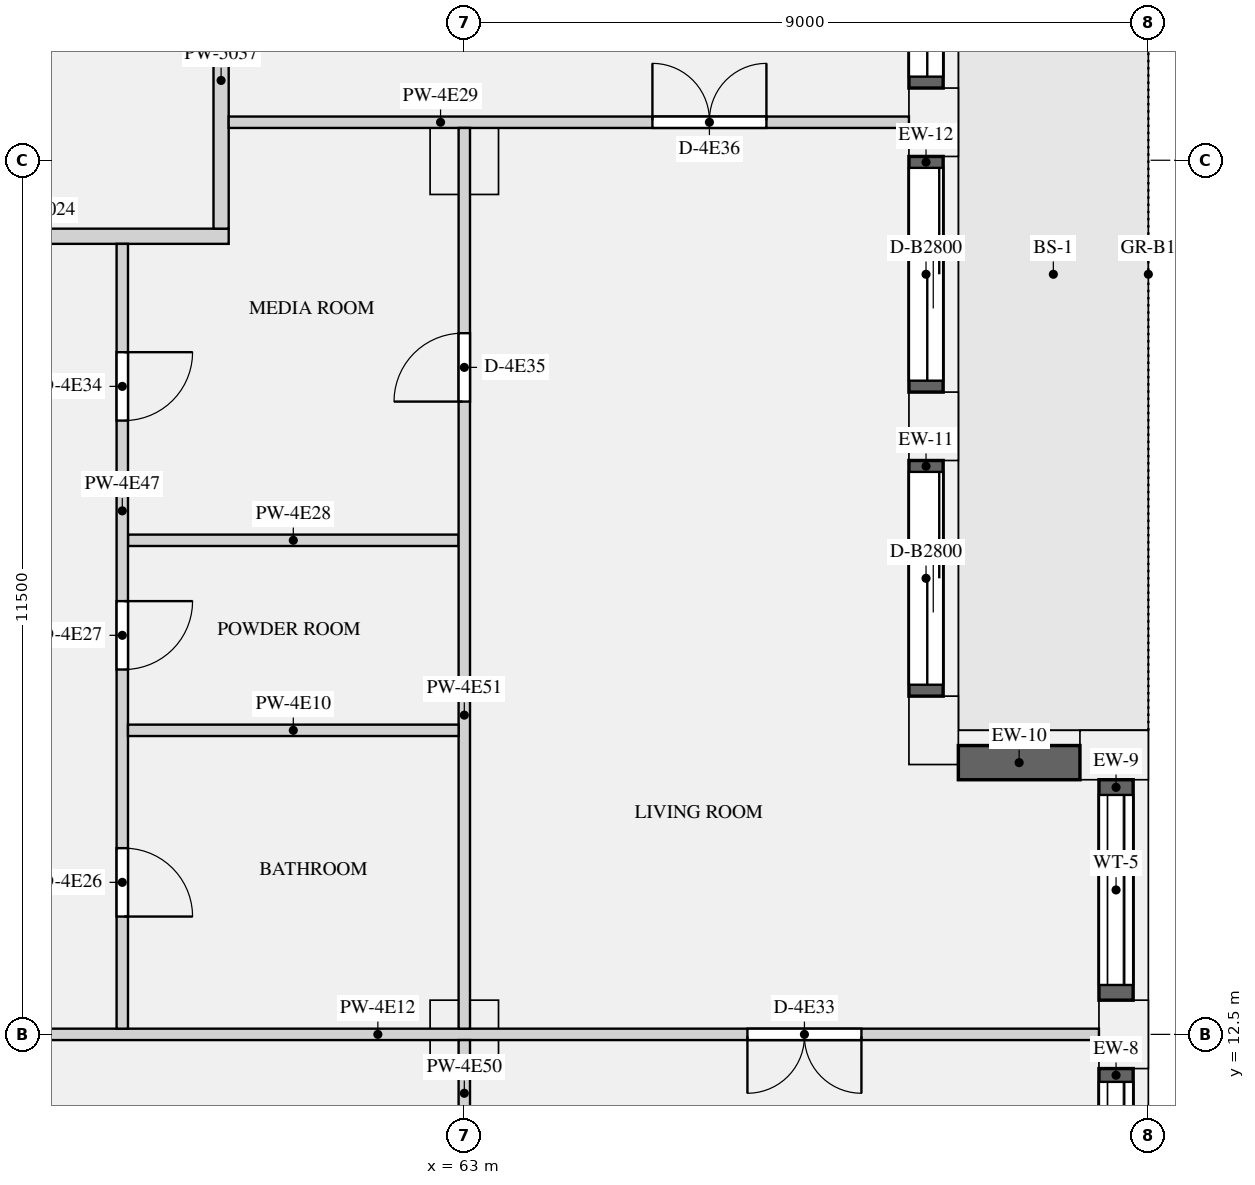
"""IFC4 building model, lengths in metres.
Left out: names, types, materials, properties, quantities, classifications, styles, units other than length and angle.
Written with IfcOpenShell. Run it as: python <this file> out.ifc"""

import sys

from ifc_helpers import new_model, si_unit, direction, frame, frame_2d, origin, origin_2d, place, context, subcontext, project, spatial, rectangle, extrude, element, fill, save


model = new_model("IFC4")
c1 = context("Model", 3, precision=1e-05, world=origin(), true_north=direction((0.0, 1.0)))
c2 = subcontext(c1, "Body", "Model", "MODEL_VIEW")
j1 = project(units=[si_unit("LENGTHUNIT", "METRE"), si_unit("PLANEANGLEUNIT", "RADIAN")], contexts=[c1])
p1 = place(None, origin())
s1 = spatial("IfcSite", under=j1, at=p1, CompositionType="ELEMENT")
p2 = place(p1, origin())
s2 = spatial("IfcBuilding", under=s1, at=p2, CompositionType="ELEMENT")
p3 = place(p2, frame((0.0, 0.0, 232.65)))
s3 = spatial("IfcBuildingStorey", under=s2, at=p3, CompositionType="ELEMENT", Elevation=232.65)
for number, where, z_axis, x_axis in (
    (1, (71.675, 12.5, 0.0), (0.0, 0.0, 1.0), (0.0, 1.0, 0.0)),
    (2, (71.55, 16.175, 0.0), (0.0, 0.0, 1.0), (-1.0, 0.0, 0.0)),
    (3, (69.175, 16.5, 0.0), (0.0, 0.0, 1.0), (0.0, 1.0, 0.0)),
    (4, (69.175, 20.5, 0.0), (0.0, 0.0, 1.0), (0.0, 1.0, 0.0)),
    (5, (69.175, 24.5, 0.0), (0.0, 0.0, 1.0), (0.0, 1.0, 0.0)),
):
    element("IfcColumn", number, at=place(p3, frame(where, z_axis=z_axis, x_axis=x_axis)), inside=s3, PredefinedType="USERDEFINED", context=c2, shape_type="SweptSolid", body=[
        extrude(rectangle(XDim=0.9, YDim=0.65, at=origin_2d()), origin(), (0.0, 0.0, 1.0), 3.15),
    ])
for number, where, z_axis, x_axis in (
    (6, (63.0, 24.0, 0.0), (0.0, 0.0, 1.0), (1.0, 0.0, 0.0)),
    (7, (63.0, 12.5, 0.0), (0.0, 0.0, 1.0), (1.0, 0.0, 0.0)),
):
    element("IfcColumn", number, at=place(p3, frame(where, z_axis=z_axis, x_axis=x_axis)), inside=s3, PredefinedType="COLUMN", context=c2, shape_type="SweptSolid", body=[
        extrude(rectangle(XDim=0.9, YDim=0.9, at=origin_2d()), origin(), (0.0, 0.0, 1.0), 3.15),
    ])
p4 = place(p3, frame((71.575, 8.95, 0.9), z_axis=(0.0, 0.0, 1.0), x_axis=(0.0, 1.0, 0.0)))
e8 = element("IfcWall", 8, at=p4, inside=s3, PredefinedType="SOLIDWALL", context=c2, shape_type="SweptSolid", body=[
    extrude(rectangle(XDim=3.1, YDim=0.45, at=frame_2d((1.55, 0.0))), origin(), (0.0, 0.0, 1.0), 1.9),
])
p5 = place(p4, frame((0.175, 0.0, 0.15)))
e9 = element("IfcOpeningElement", 9, at=p5, cuts=e8, PredefinedType="OPENING", context=c2, shape_type="SweptSolid", body=[
    extrude(rectangle(XDim=2.75, YDim=1.5, at=frame_2d((1.375, 0.75))), frame((0.0, 0.235, 0.0), z_axis=(0.0, -1.0, 0.0), x_axis=(1.0, 0.0, 0.0)), (0.0, 0.0, 1.0), 0.47),
])
p6 = place(p3, frame((71.575, 12.95, 0.9), z_axis=(0.0, 0.0, 1.0), x_axis=(0.0, 1.0, 0.0)))
e10 = element("IfcWall", 10, at=p6, inside=s3, PredefinedType="SOLIDWALL", context=c2, shape_type="SweptSolid", body=[
    extrude(rectangle(XDim=2.9, YDim=0.45, at=frame_2d((1.45, 0.0))), origin(), (0.0, 0.0, 1.0), 1.9),
])
p7 = place(p6, frame((0.2, 0.0, 0.15)))
e11 = element("IfcOpeningElement", 11, at=p7, cuts=e10, PredefinedType="OPENING", context=c2, shape_type="SweptSolid", body=[
    extrude(rectangle(XDim=2.5, YDim=1.5, at=frame_2d((1.25, 0.75))), frame((0.0, 0.235, 0.0), z_axis=(0.0, -1.0, 0.0), x_axis=(1.0, 0.0, 0.0)), (0.0, 0.0, 1.0), 0.47),
])
p8 = place(p3, frame((71.1, 16.075, 0.9), z_axis=(0.0, 0.0, 1.0), x_axis=(-1.0, 0.0, 0.0)))
e12 = element("IfcWall", 12, at=p8, inside=s3, PredefinedType="SOLIDWALL", context=c2, shape_type="SweptSolid", body=[
    extrude(rectangle(XDim=1.6, YDim=0.45, at=frame_2d((0.8, 0.0))), origin(), (0.0, 0.0, 1.0), 1.9),
])
p9 = place(p3, frame((69.075, 16.95, 0.0), z_axis=(0.0, 0.0, 1.0), x_axis=(0.0, 1.0, 0.0)))
e13 = element("IfcWall", 13, at=p9, inside=s3, PredefinedType="SOLIDWALL", context=c2, shape_type="SweptSolid", body=[
    extrude(rectangle(XDim=3.1, YDim=0.45, at=frame_2d((1.55, 0.0))), origin(), (0.0, 0.0, 1.0), 2.8),
])
p10 = place(p9, frame((0.15, 0.0, 0.0)))
e14 = element("IfcOpeningElement", 14, at=p10, cuts=e13, PredefinedType="OPENING", context=c2, shape_type="SweptSolid", body=[
    extrude(rectangle(XDim=2.8, YDim=2.3, at=frame_2d((1.4, 1.15))), frame((0.0, 0.235, 0.0), z_axis=(0.0, -1.0, 0.0), x_axis=(1.0, 0.0, 0.0)), (0.0, 0.0, 1.0), 0.47),
])
p11 = place(p3, frame((69.075, 20.95, 0.0), z_axis=(0.0, 0.0, 1.0), x_axis=(0.0, 1.0, 0.0)))
e15 = element("IfcWall", 15, at=p11, inside=s3, PredefinedType="SOLIDWALL", context=c2, shape_type="SweptSolid", body=[
    extrude(rectangle(XDim=3.1, YDim=0.45, at=frame_2d((1.55, 0.0))), origin(), (0.0, 0.0, 1.0), 2.8),
])
p12 = place(p11, frame((0.15, 0.0, 0.0)))
e16 = element("IfcOpeningElement", 16, at=p12, cuts=e15, PredefinedType="OPENING", context=c2, shape_type="SweptSolid", body=[
    extrude(rectangle(XDim=2.8, YDim=2.3, at=frame_2d((1.4, 1.15))), frame((0.0, 0.235, 0.0), z_axis=(0.0, -1.0, 0.0), x_axis=(1.0, 0.0, 0.0)), (0.0, 0.0, 1.0), 0.47),
])
p13 = place(p3, frame((69.075, 24.95, 0.0), z_axis=(0.0, 0.0, 1.0), x_axis=(0.0, 1.0, 0.0)))
e17 = element("IfcWall", 17, at=p13, inside=s3, PredefinedType="SOLIDWALL", context=c2, shape_type="SweptSolid", body=[
    extrude(rectangle(XDim=3.55, YDim=0.45, at=frame_2d((1.775, 0.0))), origin(), (0.0, 0.0, 1.0), 2.8),
])
p14 = place(p13, frame((0.15, 0.0, 0.0)))
e18 = element("IfcOpeningElement", 18, at=p14, cuts=e17, PredefinedType="OPENING", context=c2, shape_type="SweptSolid", body=[
    extrude(rectangle(XDim=3.25, YDim=2.3, at=frame_2d((1.625, 1.15))), frame((0.0, 0.235, 0.0), z_axis=(0.0, -1.0, 0.0), x_axis=(1.0, 0.0, 0.0)), (0.0, 0.0, 1.0), 0.47),
])
p15 = place(p3, frame((54.9, 23.0, 0.0), z_axis=(0.0, 0.0, 1.0), x_axis=(1.0, 0.0, 0.0)))
e19 = element("IfcWall", 19, at=p15, inside=s3, PredefinedType="PARTITIONING", context=c2, shape_type="SweptSolid", body=[
    extrude(rectangle(XDim=5.0, YDim=0.2, at=frame_2d((2.5, 0.0))), origin(), (0.0, 0.0, 1.0), 2.8),
])
p16 = place(p3, frame((59.8, 23.1, 0.0), z_axis=(0.0, 0.0, 1.0), x_axis=(0.0, 1.0, 0.0)))
e20 = element("IfcWall", 20, at=p16, inside=s3, PredefinedType="PARTITIONING", context=c2, shape_type="SweptSolid", body=[
    extrude(rectangle(XDim=3.9, YDim=0.2, at=frame_2d((1.95, 0.0))), origin(), (0.0, 0.0, 1.0), 2.8),
])
p17 = place(p3, frame((58.575, 16.5, 0.0), z_axis=(0.0, 0.0, 1.0), x_axis=(1.0, 0.0, 0.0)))
e21 = element("IfcWall", 21, at=p17, inside=s3, PredefinedType="PARTITIONING", context=c2, shape_type="SweptSolid", body=[
    extrude(rectangle(XDim=4.35, YDim=0.15, at=frame_2d((2.175, 0.0))), origin(), (0.0, 0.0, 1.0), 2.8),
])
p18 = place(p3, frame((54.0, 12.5, 0.0), z_axis=(0.0, 0.0, 1.0), x_axis=(1.0, 0.0, 0.0)))
e22 = element("IfcWall", 22, at=p18, inside=s3, PredefinedType="PARTITIONING", context=c2, shape_type="SweptSolid", body=[
    extrude(rectangle(XDim=17.35, YDim=0.15, at=frame_2d((8.675, 0.0))), origin(), (0.0, 0.0, 1.0), 2.8),
])
p19 = place(p18, frame((1.5, 0.0, 0.0)))
e23 = element("IfcOpeningElement", 23, at=p19, cuts=e22, PredefinedType="OPENING", context=c2, shape_type="SweptSolid", body=[
    extrude(rectangle(XDim=1.5, YDim=2.1, at=frame_2d((0.75, 1.05))), frame((0.0, 0.085, 0.0), z_axis=(0.0, -1.0, 0.0), x_axis=(1.0, 0.0, 0.0)), (0.0, 0.0, 1.0), 0.17),
])
p20 = place(p18, frame((12.725, 0.0, 0.0)))
e24 = element("IfcOpeningElement", 24, at=p20, cuts=e22, PredefinedType="OPENING", context=c2, shape_type="SweptSolid", body=[
    extrude(rectangle(XDim=1.5, YDim=2.1, at=frame_2d((0.75, 1.05))), frame((0.0, 0.085, 0.0), z_axis=(0.0, -1.0, 0.0), x_axis=(1.0, 0.0, 0.0)), (0.0, 0.0, 1.0), 0.17),
])
p21 = place(p3, frame((58.575, 19.0, 0.0), z_axis=(0.0, 0.0, 1.0), x_axis=(1.0, 0.0, 0.0)))
e25 = element("IfcWall", 25, at=p21, inside=s3, PredefinedType="PARTITIONING", context=c2, shape_type="SweptSolid", body=[
    extrude(rectangle(XDim=4.35, YDim=0.15, at=frame_2d((2.175, 0.0))), origin(), (0.0, 0.0, 1.0), 2.8),
])
p22 = place(p3, frame((59.9, 24.5, 0.0), z_axis=(0.0, 0.0, 1.0), x_axis=(1.0, 0.0, 0.0)))
e26 = element("IfcWall", 26, at=p22, inside=s3, PredefinedType="PARTITIONING", context=c2, shape_type="SweptSolid", body=[
    extrude(rectangle(XDim=8.95, YDim=0.15, at=frame_2d((4.475, 0.0))), origin(), (0.0, 0.0, 1.0), 2.8),
])
p23 = place(p22, frame((5.575, 0.0, 0.0)))
e27 = element("IfcOpeningElement", 27, at=p23, cuts=e26, PredefinedType="OPENING", context=c2, shape_type="SweptSolid", body=[
    extrude(rectangle(XDim=1.5, YDim=2.1, at=frame_2d((0.75, 1.05))), frame((0.0, 0.085, 0.0), z_axis=(0.0, -1.0, 0.0), x_axis=(1.0, 0.0, 0.0)), (0.0, 0.0, 1.0), 0.17),
])
p24 = place(p3, frame((58.5, 12.575, 0.0), z_axis=(0.0, 0.0, 1.0), x_axis=(0.0, 1.0, 0.0)))
e28 = element("IfcWall", 28, at=p24, inside=s3, PredefinedType="PARTITIONING", context=c2, shape_type="SweptSolid", body=[
    extrude(rectangle(XDim=10.325, YDim=0.15, at=frame_2d((5.163, 0.0))), origin(), (0.0, 0.0, 1.0), 2.8),
])
p25 = place(p24, frame((1.475, 0.0, 0.0)))
e29 = element("IfcOpeningElement", 29, at=p25, cuts=e28, PredefinedType="OPENING", context=c2, shape_type="SweptSolid", body=[
    extrude(rectangle(XDim=0.9, YDim=2.1, at=frame_2d((0.45, 1.05))), frame((0.0, 0.085, 0.0), z_axis=(0.0, -1.0, 0.0), x_axis=(1.0, 0.0, 0.0)), (0.0, 0.0, 1.0), 0.17),
])
p26 = place(p24, frame((4.725, 0.0, 0.0)))
e30 = element("IfcOpeningElement", 30, at=p26, cuts=e28, PredefinedType="OPENING", context=c2, shape_type="SweptSolid", body=[
    extrude(rectangle(XDim=0.9, YDim=2.1, at=frame_2d((0.45, 1.05))), frame((0.0, 0.085, 0.0), z_axis=(0.0, -1.0, 0.0), x_axis=(1.0, 0.0, 0.0)), (0.0, 0.0, 1.0), 0.17),
])
p27 = place(p24, frame((8.0, 0.0, 0.0)))
e31 = element("IfcOpeningElement", 31, at=p27, cuts=e28, PredefinedType="OPENING", context=c2, shape_type="SweptSolid", body=[
    extrude(rectangle(XDim=0.9, YDim=2.1, at=frame_2d((0.45, 1.05))), frame((0.0, 0.085, 0.0), z_axis=(0.0, -1.0, 0.0), x_axis=(1.0, 0.0, 0.0)), (0.0, 0.0, 1.0), 0.17),
])
p28 = place(p3, frame((63.0, 8.575, 0.0), z_axis=(0.0, 0.0, 1.0), x_axis=(0.0, 1.0, 0.0)))
e32 = element("IfcWall", 32, at=p28, inside=s3, PredefinedType="PARTITIONING", context=c2, shape_type="SweptSolid", body=[
    extrude(rectangle(XDim=3.85, YDim=0.15, at=frame_2d((1.925, 0.0))), origin(), (0.0, 0.0, 1.0), 2.8),
])
p29 = place(p28, frame((0.95, 0.0, 0.0)))
e33 = element("IfcOpeningElement", 33, at=p29, cuts=e32, PredefinedType="OPENING", context=c2, shape_type="SweptSolid", body=[
    extrude(rectangle(XDim=1.5, YDim=2.1, at=frame_2d((0.75, 1.05))), frame((0.0, 0.085, 0.0), z_axis=(0.0, -1.0, 0.0), x_axis=(1.0, 0.0, 0.0)), (0.0, 0.0, 1.0), 0.17),
])
p30 = place(p3, frame((63.0, 12.575, 0.0), z_axis=(0.0, 0.0, 1.0), x_axis=(0.0, 1.0, 0.0)))
e34 = element("IfcWall", 34, at=p30, inside=s3, PredefinedType="PARTITIONING", context=c2, shape_type="SweptSolid", body=[
    extrude(rectangle(XDim=11.85, YDim=0.15, at=frame_2d((5.925, 0.0))), origin(), (0.0, 0.0, 1.0), 2.8),
])
p31 = place(p30, frame((8.25, 0.0, 0.0)))
e35 = element("IfcOpeningElement", 35, at=p31, cuts=e34, PredefinedType="OPENING", context=c2, shape_type="SweptSolid", body=[
    extrude(rectangle(XDim=0.9, YDim=2.1, at=frame_2d((0.45, 1.05))), frame((0.0, 0.085, 0.0), z_axis=(0.0, -1.0, 0.0), x_axis=(1.0, 0.0, 0.0)), (0.0, 0.0, 1.0), 0.17),
])
p32 = place(p5, origin())
e36 = element("IfcWindow", 36, at=p32, inside=s3, PartitioningType="SINGLE_PANEL", PredefinedType="WINDOW", context=c2, shape_type="SweptSolid", body=[
    extrude(rectangle(XDim=2.75, YDim=1.5, at=frame_2d((1.375, 0.75))), frame((0.0, -0.065, 0.0), z_axis=(0.0, -1.0, 0.0), x_axis=(1.0, 0.0, 0.0)), (0.0, 0.0, 1.0), 0.06),
])
fill(e9, e36)
p33 = place(p7, origin())
e37 = element("IfcWindow", 37, at=p33, inside=s3, PartitioningType="SINGLE_PANEL", PredefinedType="WINDOW", context=c2, shape_type="SweptSolid", body=[
    extrude(rectangle(XDim=2.5, YDim=1.5, at=frame_2d((1.25, 0.75))), frame((0.0, -0.065, 0.0), z_axis=(0.0, -1.0, 0.0), x_axis=(1.0, 0.0, 0.0)), (0.0, 0.0, 1.0), 0.06),
])
fill(e11, e37)
p34 = place(p10, origin())
e38 = element("IfcDoor", 38, at=p34, inside=s3, OperationType="SLIDING_TO_LEFT", PredefinedType="DOOR", context=c2, shape_type="SweptSolid", body=[
    extrude(rectangle(XDim=2.8, YDim=2.3, at=frame_2d((1.4, 1.15))), frame((0.0, -0.07, 0.0), z_axis=(0.0, -1.0, 0.0), x_axis=(1.0, 0.0, 0.0)), (0.0, 0.0, 1.0), 0.05),
])
fill(e14, e38)
p35 = place(p12, origin())
e39 = element("IfcDoor", 39, at=p35, inside=s3, OperationType="SLIDING_TO_LEFT", PredefinedType="DOOR", context=c2, shape_type="SweptSolid", body=[
    extrude(rectangle(XDim=2.8, YDim=2.3, at=frame_2d((1.4, 1.15))), frame((0.0, -0.07, 0.0), z_axis=(0.0, -1.0, 0.0), x_axis=(1.0, 0.0, 0.0)), (0.0, 0.0, 1.0), 0.05),
])
fill(e16, e39)
p36 = place(p14, origin())
e40 = element("IfcDoor", 40, at=p36, inside=s3, OperationType="SLIDING_TO_LEFT", PredefinedType="DOOR", context=c2, shape_type="SweptSolid", body=[
    extrude(rectangle(XDim=3.25, YDim=2.3, at=frame_2d((1.625, 1.15))), frame((0.0, -0.07, 0.0), z_axis=(0.0, -1.0, 0.0), x_axis=(1.0, 0.0, 0.0)), (0.0, 0.0, 1.0), 0.05),
])
fill(e18, e40)
p37 = place(p25, frame((0.9, 0.0, 0.0), z_axis=(0.0, 0.0, 1.0), x_axis=(-1.0, 0.0, 0.0)))
e41 = element("IfcDoor", 41, at=p37, inside=s3, OperationType="SINGLE_SWING_RIGHT", PredefinedType="DOOR", context=c2, shape_type="SweptSolid", body=[
    extrude(rectangle(XDim=0.9, YDim=2.1, at=frame_2d((0.45, 1.05))), frame((0.0, 0.025, 0.0), z_axis=(0.0, -1.0, 0.0), x_axis=(1.0, 0.0, 0.0)), (0.0, 0.0, 1.0), 0.05),
])
fill(e29, e41)
p38 = place(p26, frame((0.9, 0.0, 0.0), z_axis=(0.0, 0.0, 1.0), x_axis=(-1.0, 0.0, 0.0)))
e42 = element("IfcDoor", 42, at=p38, inside=s3, OperationType="SINGLE_SWING_LEFT", PredefinedType="DOOR", context=c2, shape_type="SweptSolid", body=[
    extrude(rectangle(XDim=0.9, YDim=2.1, at=frame_2d((0.45, 1.05))), frame((0.0, 0.025, 0.0), z_axis=(0.0, -1.0, 0.0), x_axis=(1.0, 0.0, 0.0)), (0.0, 0.0, 1.0), 0.05),
])
fill(e30, e42)
p39 = place(p20, frame((1.5, 0.0, 0.0), z_axis=(0.0, 0.0, 1.0), x_axis=(-1.0, 0.0, 0.0)))
e43 = element("IfcDoor", 43, at=p39, inside=s3, OperationType="DOUBLE_DOOR_SINGLE_SWING", PredefinedType="DOOR", context=c2, shape_type="SweptSolid", body=[
    extrude(rectangle(XDim=1.5, YDim=2.1, at=frame_2d((0.75, 1.05))), frame((0.0, 0.025, 0.0), z_axis=(0.0, -1.0, 0.0), x_axis=(1.0, 0.0, 0.0)), (0.0, 0.0, 1.0), 0.05),
])
fill(e24, e43)
p40 = place(p27, frame((0.9, 0.0, 0.0), z_axis=(0.0, 0.0, 1.0), x_axis=(-1.0, 0.0, 0.0)))
e44 = element("IfcDoor", 44, at=p40, inside=s3, OperationType="SINGLE_SWING_LEFT", PredefinedType="DOOR", context=c2, shape_type="SweptSolid", body=[
    extrude(rectangle(XDim=0.9, YDim=2.1, at=frame_2d((0.45, 1.05))), frame((0.0, 0.025, 0.0), z_axis=(0.0, -1.0, 0.0), x_axis=(1.0, 0.0, 0.0)), (0.0, 0.0, 1.0), 0.05),
])
fill(e31, e44)
p41 = place(p31, origin())
e45 = element("IfcDoor", 45, at=p41, inside=s3, OperationType="SINGLE_SWING_LEFT", PredefinedType="DOOR", context=c2, shape_type="SweptSolid", body=[
    extrude(rectangle(XDim=0.9, YDim=2.1, at=frame_2d((0.45, 1.05))), frame((0.0, 0.025, 0.0), z_axis=(0.0, -1.0, 0.0), x_axis=(1.0, 0.0, 0.0)), (0.0, 0.0, 1.0), 0.05),
])
fill(e35, e45)
p42 = place(p23, origin())
e46 = element("IfcDoor", 46, at=p42, inside=s3, OperationType="DOUBLE_DOOR_SINGLE_SWING", PredefinedType="DOOR", context=c2, shape_type="SweptSolid", body=[
    extrude(rectangle(XDim=1.5, YDim=2.1, at=frame_2d((0.75, 1.05))), frame((0.0, 0.025, 0.0), z_axis=(0.0, -1.0, 0.0), x_axis=(1.0, 0.0, 0.0)), (0.0, 0.0, 1.0), 0.05),
])
fill(e27, e46)
save(model, sys.argv[1])
